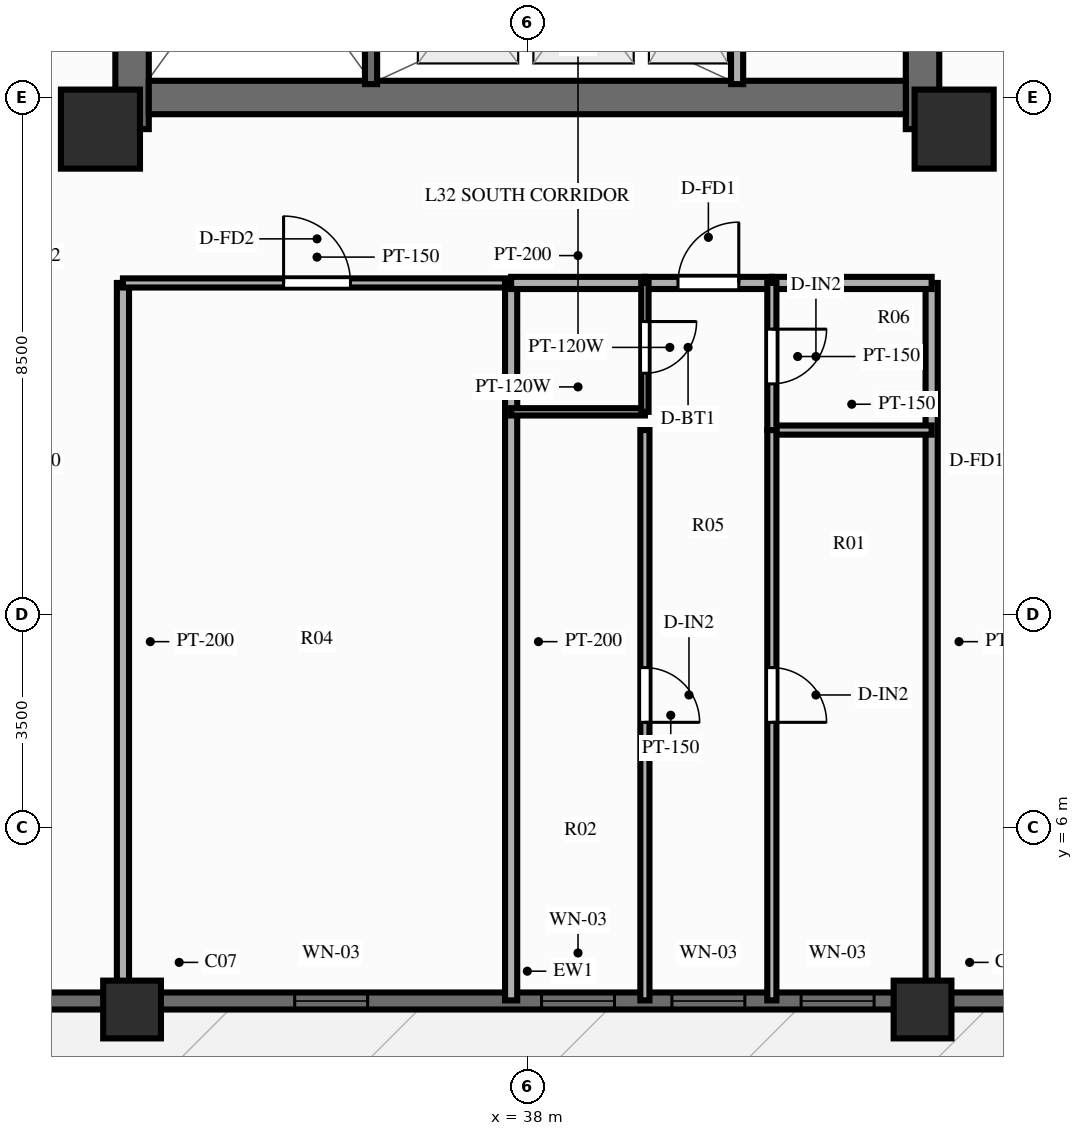
"""IFC4 building model, lengths in metres.
Left out: names, types, materials, properties, quantities, classifications, styles, units other than length and angle.
Written with IfcOpenShell. Run it as: python <this file> out.ifc"""

import sys

from ifc_helpers import new_model, si_unit, direction, frame, frame_2d, origin, origin_2d, place, context, subcontext, project, spatial, rectangle, extrude, source, transform, mapped, element, fill, save


model = new_model("IFC4")
c1 = context("Model", 3, precision=1e-05, world=origin(), true_north=direction((0.0, 1.0)))
c2 = subcontext(c1, "Body", "Model", "MODEL_VIEW")
j1 = project(units=[si_unit("LENGTHUNIT", "METRE"), si_unit("PLANEANGLEUNIT", "RADIAN")], contexts=[c1])
p1 = place(None, origin())
s1 = spatial("IfcSite", under=j1, at=p1, CompositionType="ELEMENT")
p2 = place(p1, origin())
s2 = spatial("IfcBuilding", under=s1, at=p2, CompositionType="ELEMENT")
p3 = place(p2, frame((0.0, 0.0, 101.85)))
s3 = spatial("IfcBuildingStorey", under=s2, at=p3, CompositionType="ELEMENT", Elevation=101.85)
p4 = place(p3, frame((31.5, 17.48, 0.0), z_axis=(0.0, 0.0, 1.0), x_axis=(0.0, 1.0, 0.0)))
e1 = element("IfcWall", 1, at=p4, inside=s3, PredefinedType="SHEAR", context=c2, shape_type="SweptSolid", body=[
    extrude(rectangle(XDim=19.04, YDim=0.55, at=frame_2d((9.52, 0.0))), origin(), (0.0, 0.0, 1.0), 3.0),
])
p5 = place(p4, frame((6.32, 0.0, 0.0)))
e2 = element("IfcOpeningElement", 2, at=p5, cuts=e1, PredefinedType="OPENING", context=c2, shape_type="SweptSolid", body=[
    extrude(rectangle(XDim=1.1, YDim=2.15, at=frame_2d((0.55, 1.075))), frame((0.0, 0.287, 0.0), z_axis=(0.0, -1.0, 0.0), x_axis=(1.0, 0.0, 0.0)), (0.0, 0.0, 1.0), 0.574),
])
p6 = place(p3, frame((44.5, 17.48, 0.0), z_axis=(0.0, 0.0, 1.0), x_axis=(0.0, 1.0, 0.0)))
e3 = element("IfcWall", 3, at=p6, inside=s3, PredefinedType="SHEAR", context=c2, shape_type="SweptSolid", body=[
    extrude(rectangle(XDim=19.04, YDim=0.55, at=frame_2d((9.52, 0.0))), origin(), (0.0, 0.0, 1.0), 3.0),
])
p7 = place(p6, frame((12.67, 0.0, 0.0), z_axis=(0.0, 0.0, 1.0), x_axis=(-1.0, 0.0, 0.0)))
e4 = element("IfcOpeningElement", 4, at=p7, cuts=e3, PredefinedType="OPENING", context=c2, shape_type="SweptSolid", body=[
    extrude(rectangle(XDim=1.1, YDim=2.15, at=frame_2d((0.55, 1.075))), frame((0.0, 0.287, 0.0), z_axis=(0.0, -1.0, 0.0), x_axis=(1.0, 0.0, 0.0)), (0.0, 0.0, 1.0), 0.574),
])
p8 = place(p3, frame((31.775, 18.0, 0.0), z_axis=(0.0, 0.0, 1.0), x_axis=(1.0, 0.0, 0.0)))
e5 = element("IfcWall", 5, at=p8, inside=s3, PredefinedType="SHEAR", context=c2, shape_type="SweptSolid", body=[
    extrude(rectangle(XDim=12.45, YDim=0.55, at=frame_2d((6.225, 0.0))), origin(), (0.0, 0.0, 1.0), 3.0),
])
m1 = source(origin(), c2, "Body", "SweptSolid", [
    extrude(rectangle(XDim=1.3, YDim=1.3, at=origin_2d()), origin(), (0.0, 0.0, 1.0), 3.0),
])
for number, where, z_axis, x_axis in (
    (6, (30.98, 17.48, 0.0), (0.0, 0.0, 1.0), (1.0, 0.0, 0.0)),
    (7, (45.02, 17.48, 0.0), (0.0, 0.0, 1.0), (1.0, 0.0, 0.0)),
):
    element("IfcColumn", number, at=place(p3, frame(where, z_axis=z_axis, x_axis=x_axis)), inside=s3, PredefinedType="COLUMN", context=c2, shape_type="MappedRepresentation", body=[
        mapped(m1, transform((0.0, 0.0, 0.0), scale=1.0)),
    ])
m2 = source(origin(), c2, "Body", "SweptSolid", [
    extrude(rectangle(XDim=0.95, YDim=0.95, at=origin_2d()), origin(), (0.0, 0.0, 1.0), 3.0),
])
for number, where, z_axis, x_axis in (
    (8, (31.5, 3.0, 0.0), (0.0, 0.0, 1.0), (1.0, 0.0, 0.0)),
    (9, (44.5, 3.0, 0.0), (0.0, 0.0, 1.0), (1.0, 0.0, 0.0)),
):
    element("IfcColumn", number, at=place(p3, frame(where, z_axis=z_axis, x_axis=x_axis)), inside=s3, PredefinedType="COLUMN", context=c2, shape_type="MappedRepresentation", body=[
        mapped(m2, transform((0.0, 0.0, 0.0), scale=1.0)),
    ])
p9 = place(p3, frame((16.2, 3.14, 0.0), z_axis=(0.0, 0.0, 1.0), x_axis=(1.0, 0.0, 0.0)))
e10 = element("IfcWall", 10, at=p9, inside=s3, PredefinedType="SOLIDWALL", context=c2, shape_type="SweptSolid", body=[
    extrude(rectangle(XDim=43.6, YDim=0.28, at=frame_2d((21.8, 0.0))), origin(), (0.0, 0.0, 1.0), 2.28),
])
p10 = place(p9, frame((8.2, 0.0, 0.0), z_axis=(0.0, 0.0, 1.0), x_axis=(-1.0, 0.0, 0.0)))
e11 = element("IfcOpeningElement", 11, at=p10, cuts=e10, PredefinedType="OPENING", context=c2, shape_type="SweptSolid", body=[
    extrude(rectangle(XDim=1.1, YDim=2.15, at=frame_2d((0.55, 1.075))), frame((0.0, 0.152, 0.0), z_axis=(0.0, -1.0, 0.0), x_axis=(1.0, 0.0, 0.0)), (0.0, 0.0, 1.0), 0.304),
])
p11 = place(p9, frame((17.975, 0.0, 0.25)))
e12 = element("IfcOpeningElement", 12, at=p11, cuts=e10, PredefinedType="OPENING", context=c2, shape_type="SweptSolid", body=[
    extrude(rectangle(XDim=1.2, YDim=1.5, at=frame_2d((0.6, 0.75))), frame((0.0, 0.152, 0.0), z_axis=(0.0, -1.0, 0.0), x_axis=(1.0, 0.0, 0.0)), (0.0, 0.0, 1.0), 0.304),
])
p12 = place(p9, frame((22.034, 0.0, 0.25)))
e13 = element("IfcOpeningElement", 13, at=p12, cuts=e10, PredefinedType="OPENING", context=c2, shape_type="SweptSolid", body=[
    extrude(rectangle(XDim=1.2, YDim=1.5, at=frame_2d((0.6, 0.75))), frame((0.0, 0.152, 0.0), z_axis=(0.0, -1.0, 0.0), x_axis=(1.0, 0.0, 0.0)), (0.0, 0.0, 1.0), 0.304),
])
p13 = place(p9, frame((24.178, 0.0, 0.25)))
e14 = element("IfcOpeningElement", 14, at=p13, cuts=e10, PredefinedType="OPENING", context=c2, shape_type="SweptSolid", body=[
    extrude(rectangle(XDim=1.2, YDim=1.5, at=frame_2d((0.6, 0.75))), frame((0.0, 0.152, 0.0), z_axis=(0.0, -1.0, 0.0), x_axis=(1.0, 0.0, 0.0)), (0.0, 0.0, 1.0), 0.304),
])
p14 = place(p9, frame((26.303, 0.0, 0.25)))
e15 = element("IfcOpeningElement", 15, at=p14, cuts=e10, PredefinedType="OPENING", context=c2, shape_type="SweptSolid", body=[
    extrude(rectangle(XDim=1.2, YDim=1.5, at=frame_2d((0.6, 0.75))), frame((0.0, 0.152, 0.0), z_axis=(0.0, -1.0, 0.0), x_axis=(1.0, 0.0, 0.0)), (0.0, 0.0, 1.0), 0.304),
])
p15 = place(p9, frame((35.35, 0.0, 0.25)))
e16 = element("IfcOpeningElement", 16, at=p15, cuts=e10, PredefinedType="OPENING", context=c2, shape_type="SweptSolid", body=[
    extrude(rectangle(XDim=1.2, YDim=1.5, at=frame_2d((0.6, 0.75))), frame((0.0, 0.152, 0.0), z_axis=(0.0, -1.0, 0.0), x_axis=(1.0, 0.0, 0.0)), (0.0, 0.0, 1.0), 0.304),
])
p16 = place(p3, frame((41.45, 18.22, 0.0), z_axis=(0.0, 0.0, 1.0), x_axis=(0.0, 1.0, 0.0)))
e17 = element("IfcWall", 17, at=p16, inside=s3, PredefinedType="PARTITIONING", context=c2, shape_type="SweptSolid", body=[
    extrude(rectangle(XDim=2.96, YDim=0.2, at=frame_2d((1.48, 0.0))), origin(), (0.0, 0.0, 1.0), 2.79),
])
p17 = place(p3, frame((35.43, 18.22, 0.0), z_axis=(0.0, 0.0, 1.0), x_axis=(0.0, 1.0, 0.0)))
e18 = element("IfcWall", 18, at=p17, inside=s3, PredefinedType="SOLIDWALL", context=c2, shape_type="SweptSolid", body=[
    extrude(rectangle(XDim=7.22, YDim=0.2, at=frame_2d((3.61, 0.0))), origin(), (0.0, 0.0, 1.0), 2.79),
])
p18 = place(p17, frame((6.68, 0.0, 0.0), z_axis=(0.0, 0.0, 1.0), x_axis=(-1.0, 0.0, 0.0)))
e19 = element("IfcOpeningElement", 19, at=p18, cuts=e18, PredefinedType="OPENING", context=c2, shape_type="SweptSolid", body=[
    extrude(rectangle(XDim=1.1, YDim=2.15, at=frame_2d((0.55, 1.075))), frame((0.0, 0.112, 0.0), z_axis=(0.0, -1.0, 0.0), x_axis=(1.0, 0.0, 0.0)), (0.0, 0.0, 1.0), 0.224),
])
for number, where, z_axis, x_axis in (
    (20, (31.35, 14.95, 0.0), (0.0, 0.0, 1.0), (0.0, -1.0, 0.0)),
    (21, (44.65, 14.95, 0.0), (0.0, 0.0, 1.0), (0.0, -1.0, 0.0)),
):
    element("IfcWall", number, at=place(p3, frame(where, z_axis=z_axis, x_axis=x_axis)), inside=s3, PredefinedType="PARTITIONING", context=c2, shape_type="SweptSolid", body=[
        extrude(rectangle(XDim=11.8, YDim=0.2, at=frame_2d((5.9, 0.0))), origin(), (0.0, 0.0, 1.0), 2.34),
    ])
p19 = place(p3, frame((31.35, 14.95, 0.0), z_axis=(0.0, 0.0, 1.0), x_axis=(1.0, 0.0, 0.0)))
e22 = element("IfcWall", 22, at=p19, inside=s3, PredefinedType="PARTITIONING", context=c2, shape_type="SweptSolid", body=[
    extrude(rectangle(XDim=6.384, YDim=0.15, at=frame_2d((3.192, 0.0))), origin(), (0.0, 0.0, 1.0), 2.79),
])
p20 = place(p19, frame((2.642, 0.0, 0.0)))
e23 = element("IfcOpeningElement", 23, at=p20, cuts=e22, PredefinedType="OPENING", context=c2, shape_type="SweptSolid", body=[
    extrude(rectangle(XDim=1.1, YDim=2.15, at=frame_2d((0.55, 1.075))), frame((0.0, 0.087, 0.0), z_axis=(0.0, -1.0, 0.0), x_axis=(1.0, 0.0, 0.0)), (0.0, 0.0, 1.0), 0.174),
])
p21 = place(p3, frame((37.734, 14.95, 0.0), z_axis=(0.0, 0.0, 1.0), x_axis=(0.0, -1.0, 0.0)))
e24 = element("IfcWall", 24, at=p21, inside=s3, PredefinedType="PARTITIONING", context=c2, shape_type="SweptSolid", body=[
    extrude(rectangle(XDim=11.8, YDim=0.2, at=frame_2d((5.9, 0.0))), origin(), (0.0, 0.0, 1.0), 2.79),
])
p22 = place(p3, frame((37.734, 14.95, 0.0), z_axis=(0.0, 0.0, 1.0), x_axis=(1.0, 0.0, 0.0)))
e25 = element("IfcWall", 25, at=p22, inside=s3, PredefinedType="PARTITIONING", context=c2, shape_type="SweptSolid", body=[
    extrude(rectangle(XDim=2.2, YDim=0.2, at=frame_2d((1.1, 0.0))), origin(), (0.0, 0.0, 1.0), 2.79),
])
p23 = place(p3, frame((39.934, 14.95, 0.0), z_axis=(0.0, 0.0, 1.0), x_axis=(1.0, 0.0, 0.0)))
e26 = element("IfcWall", 26, at=p23, inside=s3, PredefinedType="PARTITIONING", context=c2, shape_type="SweptSolid", body=[
    extrude(rectangle(XDim=2.088, YDim=0.2, at=frame_2d((1.044, 0.0))), origin(), (0.0, 0.0, 1.0), 2.79),
])
p24 = place(p23, frame((0.544, 0.0, 0.0)))
e27 = element("IfcOpeningElement", 27, at=p24, cuts=e26, PredefinedType="OPENING", context=c2, shape_type="SweptSolid", body=[
    extrude(rectangle(XDim=1.0, YDim=2.15, at=frame_2d((0.5, 1.075))), frame((0.0, 0.112, 0.0), z_axis=(0.0, -1.0, 0.0), x_axis=(1.0, 0.0, 0.0)), (0.0, 0.0, 1.0), 0.224),
])
p25 = place(p3, frame((42.022, 14.95, 0.0), z_axis=(0.0, 0.0, 1.0), x_axis=(1.0, 0.0, 0.0)))
e28 = element("IfcWall", 28, at=p25, inside=s3, PredefinedType="PARTITIONING", context=c2, shape_type="SweptSolid", body=[
    extrude(rectangle(XDim=2.628, YDim=0.2, at=frame_2d((1.314, 0.0))), origin(), (0.0, 0.0, 1.0), 2.79),
])
p26 = place(p3, frame((37.734, 12.83, 0.0), z_axis=(0.0, 0.0, 1.0), x_axis=(1.0, 0.0, 0.0)))
e29 = element("IfcWall", 29, at=p26, inside=s3, PredefinedType="PARTITIONING", context=c2, shape_type="SweptSolid", body=[
    extrude(rectangle(XDim=2.2, YDim=0.12, at=frame_2d((1.1, 0.0))), origin(), (0.0, 0.0, 1.0), 2.79),
])
p27 = place(p3, frame((42.022, 12.53, 0.0), z_axis=(0.0, 0.0, 1.0), x_axis=(1.0, 0.0, 0.0)))
e30 = element("IfcWall", 30, at=p27, inside=s3, PredefinedType="PARTITIONING", context=c2, shape_type="SweptSolid", body=[
    extrude(rectangle(XDim=2.628, YDim=0.15, at=frame_2d((1.314, 0.0))), origin(), (0.0, 0.0, 1.0), 2.79),
])
p28 = place(p3, frame((39.934, 14.95, 0.0), z_axis=(0.0, 0.0, 1.0), x_axis=(0.0, -1.0, 0.0)))
e31 = element("IfcWall", 31, at=p28, inside=s3, PredefinedType="PARTITIONING", context=c2, shape_type="SweptSolid", body=[
    extrude(rectangle(XDim=2.12, YDim=0.12, at=frame_2d((1.06, 0.0))), origin(), (0.0, 0.0, 1.0), 2.79),
])
p29 = place(p28, frame((0.635, 0.0, 0.0)))
e32 = element("IfcOpeningElement", 32, at=p29, cuts=e31, PredefinedType="OPENING", context=c2, shape_type="SweptSolid", body=[
    extrude(rectangle(XDim=0.85, YDim=2.05, at=frame_2d((0.425, 1.025))), frame((0.0, 0.072, 0.0), z_axis=(0.0, -1.0, 0.0), x_axis=(1.0, 0.0, 0.0)), (0.0, 0.0, 1.0), 0.144),
])
p30 = place(p3, frame((39.934, 12.53, 0.0), z_axis=(0.0, 0.0, 1.0), x_axis=(0.0, -1.0, 0.0)))
e33 = element("IfcWall", 33, at=p30, inside=s3, PredefinedType="PARTITIONING", context=c2, shape_type="SweptSolid", body=[
    extrude(rectangle(XDim=9.38, YDim=0.15, at=frame_2d((4.69, 0.0))), origin(), (0.0, 0.0, 1.0), 2.79),
])
p31 = place(p30, frame((3.907, 0.0, 0.0)))
e34 = element("IfcOpeningElement", 34, at=p31, cuts=e33, PredefinedType="OPENING", context=c2, shape_type="SweptSolid", body=[
    extrude(rectangle(XDim=0.9, YDim=2.1, at=frame_2d((0.45, 1.05))), frame((0.0, 0.087, 0.0), z_axis=(0.0, -1.0, 0.0), x_axis=(1.0, 0.0, 0.0)), (0.0, 0.0, 1.0), 0.174),
])
p32 = place(p3, frame((42.022, 14.95, 0.0), z_axis=(0.0, 0.0, 1.0), x_axis=(0.0, -1.0, 0.0)))
e35 = element("IfcWall", 35, at=p32, inside=s3, PredefinedType="PARTITIONING", context=c2, shape_type="SweptSolid", body=[
    extrude(rectangle(XDim=2.42, YDim=0.15, at=frame_2d((1.21, 0.0))), origin(), (0.0, 0.0, 1.0), 2.79),
])
p33 = place(p32, frame((0.76, 0.0, 0.0)))
e36 = element("IfcOpeningElement", 36, at=p33, cuts=e35, PredefinedType="OPENING", context=c2, shape_type="SweptSolid", body=[
    extrude(rectangle(XDim=0.9, YDim=2.1, at=frame_2d((0.45, 1.05))), frame((0.0, 0.087, 0.0), z_axis=(0.0, -1.0, 0.0), x_axis=(1.0, 0.0, 0.0)), (0.0, 0.0, 1.0), 0.174),
])
p34 = place(p3, frame((42.022, 12.53, 0.0), z_axis=(0.0, 0.0, 1.0), x_axis=(0.0, -1.0, 0.0)))
e37 = element("IfcWall", 37, at=p34, inside=s3, PredefinedType="PARTITIONING", context=c2, shape_type="SweptSolid", body=[
    extrude(rectangle(XDim=9.38, YDim=0.15, at=frame_2d((4.69, 0.0))), origin(), (0.0, 0.0, 1.0), 2.79),
])
p35 = place(p34, frame((3.907, 0.0, 0.0)))
e38 = element("IfcOpeningElement", 38, at=p35, cuts=e37, PredefinedType="OPENING", context=c2, shape_type="SweptSolid", body=[
    extrude(rectangle(XDim=0.9, YDim=2.1, at=frame_2d((0.45, 1.05))), frame((0.0, 0.087, 0.0), z_axis=(0.0, -1.0, 0.0), x_axis=(1.0, 0.0, 0.0)), (0.0, 0.0, 1.0), 0.174),
])
m3 = source(origin(), c2, "Body", "SweptSolid", [
    extrude(rectangle(XDim=1.2, YDim=1.5, at=frame_2d((0.6, 0.75))), frame((0.0, 0.03, 0.0), z_axis=(0.0, -1.0, 0.0), x_axis=(1.0, 0.0, 0.0)), (0.0, 0.0, 1.0), 0.06),
])
p36 = place(p11, origin())
e39 = element("IfcWindow", 39, at=p36, inside=s3, PartitioningType="SINGLE_PANEL", PredefinedType="WINDOW", context=c2, shape_type="MappedRepresentation", body=[
    mapped(m3, transform((0.0, 0.0, 0.0), scale=1.0)),
])
fill(e12, e39)
p37 = place(p12, origin())
e40 = element("IfcWindow", 40, at=p37, inside=s3, PartitioningType="SINGLE_PANEL", PredefinedType="WINDOW", context=c2, shape_type="MappedRepresentation", body=[
    mapped(m3, transform((0.0, 0.0, 0.0), scale=1.0)),
])
fill(e13, e40)
p38 = place(p13, origin())
e41 = element("IfcWindow", 41, at=p38, inside=s3, PartitioningType="SINGLE_PANEL", PredefinedType="WINDOW", context=c2, shape_type="MappedRepresentation", body=[
    mapped(m3, transform((0.0, 0.0, 0.0), scale=1.0)),
])
fill(e14, e41)
p39 = place(p14, origin())
e42 = element("IfcWindow", 42, at=p39, inside=s3, PartitioningType="SINGLE_PANEL", PredefinedType="WINDOW", context=c2, shape_type="MappedRepresentation", body=[
    mapped(m3, transform((0.0, 0.0, 0.0), scale=1.0)),
])
fill(e15, e42)
m4 = source(origin(), c2, "Body", "SweptSolid", [
    extrude(rectangle(XDim=1.1, YDim=2.15, at=frame_2d((0.55, 1.075))), frame((0.0, 0.025, 0.0), z_axis=(0.0, -1.0, 0.0), x_axis=(1.0, 0.0, 0.0)), (0.0, 0.0, 1.0), 0.05),
])
p40 = place(p20, origin())
e43 = element("IfcDoor", 43, at=p40, inside=s3, OperationType="SINGLE_SWING_LEFT", PredefinedType="DOOR", context=c2, shape_type="MappedRepresentation", body=[
    mapped(m4, transform((0.0, 0.0, 0.0), scale=1.0)),
])
fill(e23, e43)
m5 = source(origin(), c2, "Body", "SweptSolid", [
    extrude(rectangle(XDim=1.0, YDim=2.15, at=frame_2d((0.5, 1.075))), frame((0.0, 0.025, 0.0), z_axis=(0.0, -1.0, 0.0), x_axis=(1.0, 0.0, 0.0)), (0.0, 0.0, 1.0), 0.05),
])
p41 = place(p24, origin())
e44 = element("IfcDoor", 44, at=p41, inside=s3, OperationType="SINGLE_SWING_RIGHT", PredefinedType="DOOR", context=c2, shape_type="MappedRepresentation", body=[
    mapped(m5, transform((0.0, 0.0, 0.0), scale=1.0)),
])
fill(e27, e44)
m6 = source(origin(), c2, "Body", "SweptSolid", [
    extrude(rectangle(XDim=0.85, YDim=2.05, at=frame_2d((0.425, 1.025))), frame((0.0, 0.025, 0.0), z_axis=(0.0, -1.0, 0.0), x_axis=(1.0, 0.0, 0.0)), (0.0, 0.0, 1.0), 0.05),
])
p42 = place(p29, origin())
e45 = element("IfcDoor", 45, at=p42, inside=s3, OperationType="SINGLE_SWING_LEFT", PredefinedType="DOOR", context=c2, shape_type="MappedRepresentation", body=[
    mapped(m6, transform((0.0, 0.0, 0.0), scale=1.0)),
])
fill(e32, e45)
m7 = source(origin(), c2, "Body", "SweptSolid", [
    extrude(rectangle(XDim=0.9, YDim=2.1, at=frame_2d((0.45, 1.05))), frame((0.0, 0.025, 0.0), z_axis=(0.0, -1.0, 0.0), x_axis=(1.0, 0.0, 0.0)), (0.0, 0.0, 1.0), 0.05),
])
p43 = place(p31, origin())
e46 = element("IfcDoor", 46, at=p43, inside=s3, OperationType="SINGLE_SWING_RIGHT", PredefinedType="DOOR", context=c2, shape_type="MappedRepresentation", body=[
    mapped(m7, transform((0.0, 0.0, 0.0), scale=1.0)),
])
fill(e34, e46)
p44 = place(p33, origin())
e47 = element("IfcDoor", 47, at=p44, inside=s3, OperationType="SINGLE_SWING_LEFT", PredefinedType="DOOR", context=c2, shape_type="MappedRepresentation", body=[
    mapped(m7, transform((0.0, 0.0, 0.0), scale=1.0)),
])
fill(e36, e47)
p45 = place(p35, origin())
e48 = element("IfcDoor", 48, at=p45, inside=s3, OperationType="SINGLE_SWING_RIGHT", PredefinedType="DOOR", context=c2, shape_type="MappedRepresentation", body=[
    mapped(m7, transform((0.0, 0.0, 0.0), scale=1.0)),
])
fill(e38, e48)
save(model, sys.argv[1])
